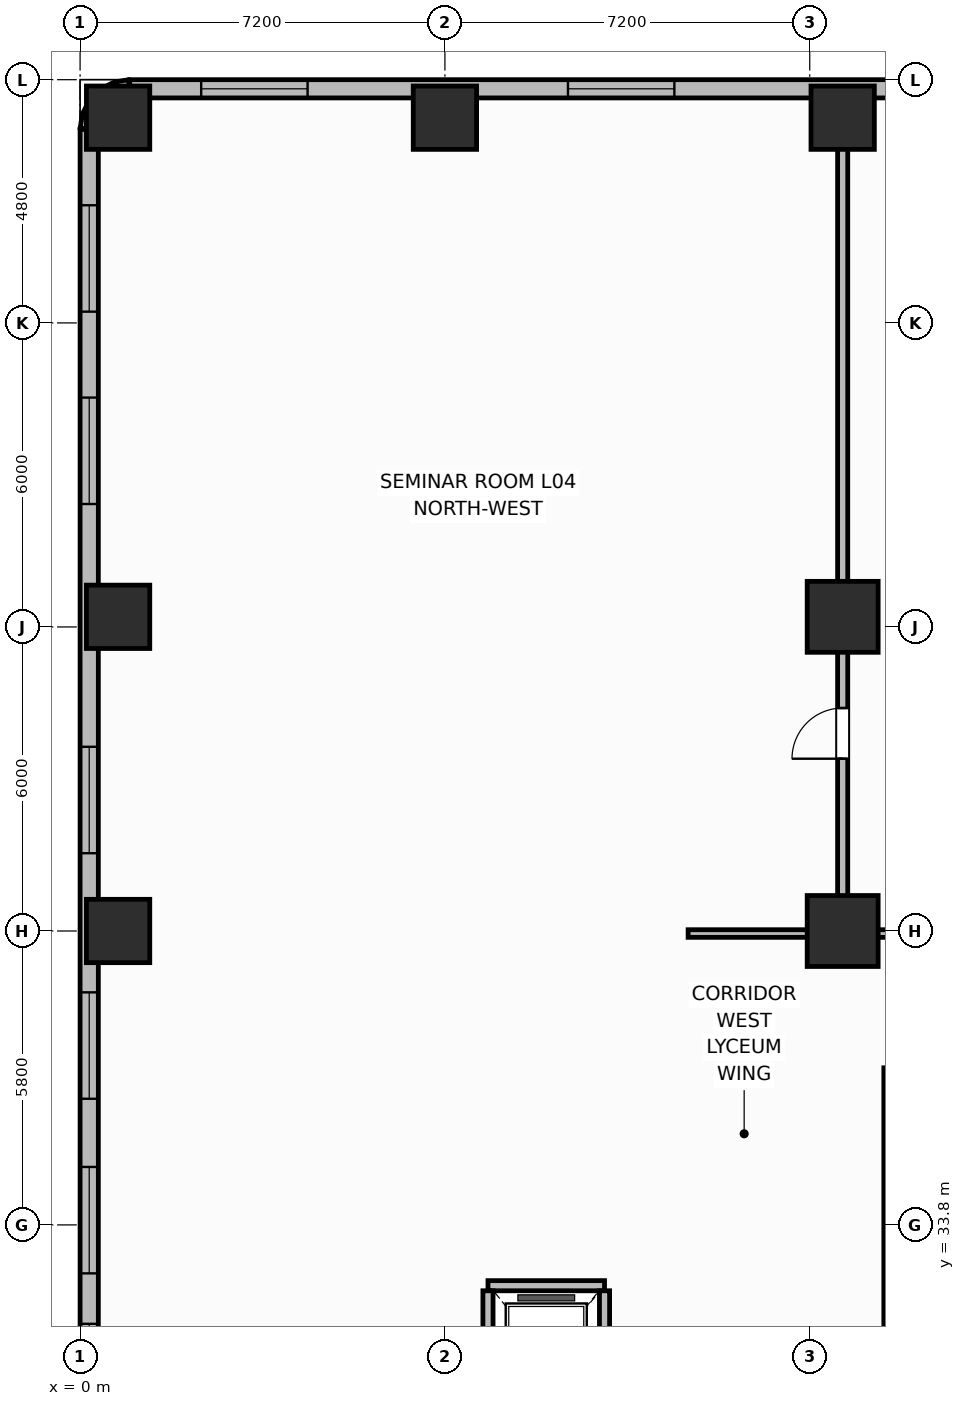
"""IFC4 building model, lengths in metres.
Left out: names, types, materials, properties, quantities, classifications, styles, units other than length and angle.
Written with IfcOpenShell. Run it as: python <this file> out.ifc"""

import sys

from ifc_helpers import new_model, si_unit, direction, frame, frame_2d, origin, origin_2d, place, context, subcontext, project, spatial, rectangle, extrude, element, fill, save


model = new_model("IFC4")
c1 = context("Model", 3, precision=1e-05, world=origin(), true_north=direction((0.0, 1.0)))
c2 = subcontext(c1, "Body", "Model", "MODEL_VIEW")
j1 = project(units=[si_unit("LENGTHUNIT", "METRE"), si_unit("PLANEANGLEUNIT", "RADIAN")], contexts=[c1])
p1 = place(None, origin())
s1 = spatial("IfcSite", under=j1, at=p1, CompositionType="ELEMENT")
p2 = place(p1, origin())
s2 = spatial("IfcBuilding", under=s1, at=p2, CompositionType="ELEMENT")
p3 = place(p2, frame((0.0, 0.0, 20.1)))
s3 = spatial("IfcBuildingStorey", under=s2, at=p3, CompositionType="ELEMENT", Elevation=20.1)
for number, where, z_axis, x_axis in (
    (1, (0.75, 39.6, 0.0), (0.0, 0.0, 1.0), (1.0, 0.0, 0.0)),
    (2, (0.75, 45.8, 0.0), (0.0, 0.0, 1.0), (1.0, 0.0, 0.0)),
    (3, (0.75, 55.65, 0.0), (0.0, 0.0, 1.0), (1.0, 0.0, 0.0)),
    (4, (7.2, 55.65, 0.0), (0.0, 0.0, 1.0), (1.0, 0.0, 0.0)),
    (5, (15.05, 55.65, 0.0), (0.0, 0.0, 1.0), (1.0, 0.0, 0.0)),
):
    element("IfcColumn", number, at=place(p3, frame(where, z_axis=z_axis, x_axis=x_axis)), inside=s3, PredefinedType="COLUMN", context=c2, shape_type="SweptSolid", body=[
        extrude(rectangle(XDim=1.25, YDim=1.25, at=origin_2d()), origin(), (0.0, 0.0, 1.0), 4.5),
    ])
for number, where, z_axis, x_axis in (
    (6, (15.05, 39.6, 0.0), (0.0, 0.0, 1.0), (1.0, 0.0, 0.0)),
    (7, (15.05, 45.8, 0.0), (0.0, 0.0, 1.0), (1.0, 0.0, 0.0)),
):
    element("IfcColumn", number, at=place(p3, frame(where, z_axis=z_axis, x_axis=x_axis)), inside=s3, PredefinedType="COLUMN", context=c2, shape_type="SweptSolid", body=[
        extrude(rectangle(XDim=1.4, YDim=1.4, at=origin_2d()), origin(), (0.0, 0.0, 1.0), 4.5),
    ])
p4 = place(p3, frame((56.57, 56.22, 0.0), z_axis=(0.0, 0.0, 1.0), x_axis=(-1.0, 0.0, 0.0)))
e8 = element("IfcWall", 8, at=p4, inside=s3, PredefinedType="SOLIDWALL", context=c2, shape_type="SweptSolid", body=[
    extrude(rectangle(XDim=55.59, YDim=0.36, at=frame_2d((27.795, 0.0))), origin(), (0.0, 0.0, 1.0), 2.3),
])
p5 = place(p4, frame((5.029, 0.0, 0.3)))
e9 = element("IfcOpeningElement", 9, at=p5, cuts=e8, PredefinedType="OPENING", context=c2, shape_type="SweptSolid", body=[
    extrude(rectangle(XDim=2.1, YDim=2.2, at=frame_2d((1.05, 1.1))), frame((0.0, 0.19, 0.0), z_axis=(0.0, -1.0, 0.0), x_axis=(1.0, 0.0, 0.0)), (0.0, 0.0, 1.0), 0.38),
])
p6 = place(p4, frame((8.648, 0.0, 0.3)))
e10 = element("IfcOpeningElement", 10, at=p6, cuts=e8, PredefinedType="OPENING", context=c2, shape_type="SweptSolid", body=[
    extrude(rectangle(XDim=2.1, YDim=2.2, at=frame_2d((1.05, 1.1))), frame((0.0, 0.19, 0.0), z_axis=(0.0, -1.0, 0.0), x_axis=(1.0, 0.0, 0.0)), (0.0, 0.0, 1.0), 0.38),
])
p7 = place(p4, frame((12.268, 0.0, 0.3)))
e11 = element("IfcOpeningElement", 11, at=p7, cuts=e8, PredefinedType="OPENING", context=c2, shape_type="SweptSolid", body=[
    extrude(rectangle(XDim=2.1, YDim=2.2, at=frame_2d((1.05, 1.1))), frame((0.0, 0.19, 0.0), z_axis=(0.0, -1.0, 0.0), x_axis=(1.0, 0.0, 0.0)), (0.0, 0.0, 1.0), 0.38),
])
p8 = place(p4, frame((19.506, 0.0, 0.3)))
e12 = element("IfcOpeningElement", 12, at=p8, cuts=e8, PredefinedType="OPENING", context=c2, shape_type="SweptSolid", body=[
    extrude(rectangle(XDim=2.1, YDim=2.2, at=frame_2d((1.05, 1.1))), frame((0.0, 0.19, 0.0), z_axis=(0.0, -1.0, 0.0), x_axis=(1.0, 0.0, 0.0)), (0.0, 0.0, 1.0), 0.38),
])
p9 = place(p4, frame((23.126, 0.0, 0.3)))
e13 = element("IfcOpeningElement", 13, at=p9, cuts=e8, PredefinedType="OPENING", context=c2, shape_type="SweptSolid", body=[
    extrude(rectangle(XDim=2.1, YDim=2.2, at=frame_2d((1.05, 1.1))), frame((0.0, 0.19, 0.0), z_axis=(0.0, -1.0, 0.0), x_axis=(1.0, 0.0, 0.0)), (0.0, 0.0, 1.0), 0.38),
])
p10 = place(p4, frame((26.745, 0.0, 0.3)))
e14 = element("IfcOpeningElement", 14, at=p10, cuts=e8, PredefinedType="OPENING", context=c2, shape_type="SweptSolid", body=[
    extrude(rectangle(XDim=2.1, YDim=2.2, at=frame_2d((1.05, 1.1))), frame((0.0, 0.19, 0.0), z_axis=(0.0, -1.0, 0.0), x_axis=(1.0, 0.0, 0.0)), (0.0, 0.0, 1.0), 0.38),
])
p11 = place(p4, frame((33.984, 0.0, 0.3)))
e15 = element("IfcOpeningElement", 15, at=p11, cuts=e8, PredefinedType="OPENING", context=c2, shape_type="SweptSolid", body=[
    extrude(rectangle(XDim=2.1, YDim=2.2, at=frame_2d((1.05, 1.1))), frame((0.0, 0.19, 0.0), z_axis=(0.0, -1.0, 0.0), x_axis=(1.0, 0.0, 0.0)), (0.0, 0.0, 1.0), 0.38),
])
p12 = place(p4, frame((37.603, 0.0, 0.3)))
e16 = element("IfcOpeningElement", 16, at=p12, cuts=e8, PredefinedType="OPENING", context=c2, shape_type="SweptSolid", body=[
    extrude(rectangle(XDim=2.1, YDim=2.2, at=frame_2d((1.05, 1.1))), frame((0.0, 0.19, 0.0), z_axis=(0.0, -1.0, 0.0), x_axis=(1.0, 0.0, 0.0)), (0.0, 0.0, 1.0), 0.38),
])
p13 = place(p4, frame((44.842, 0.0, 0.3)))
e17 = element("IfcOpeningElement", 17, at=p13, cuts=e8, PredefinedType="OPENING", context=c2, shape_type="SweptSolid", body=[
    extrude(rectangle(XDim=2.1, YDim=2.2, at=frame_2d((1.05, 1.1))), frame((0.0, 0.19, 0.0), z_axis=(0.0, -1.0, 0.0), x_axis=(1.0, 0.0, 0.0)), (0.0, 0.0, 1.0), 0.38),
])
p14 = place(p4, frame((52.08, 0.0, 0.3)))
e18 = element("IfcOpeningElement", 18, at=p14, cuts=e8, PredefinedType="OPENING", context=c2, shape_type="SweptSolid", body=[
    extrude(rectangle(XDim=2.1, YDim=2.2, at=frame_2d((1.05, 1.1))), frame((0.0, 0.19, 0.0), z_axis=(0.0, -1.0, 0.0), x_axis=(1.0, 0.0, 0.0)), (0.0, 0.0, 1.0), 0.38),
])
p15 = place(p3, frame((0.98, 56.22, 0.0), z_axis=(0.0, 0.0, 1.0), x_axis=(-0.987731290312, -0.156163049852, 0.0)))
e19 = element("IfcWall", 19, at=p15, inside=s3, PredefinedType="SOLIDWALL", context=c2, shape_type="SweptSolid", body=[
    extrude(rectangle(XDim=0.25, YDim=0.36, at=frame_2d((0.125, 0.0))), origin(), (0.0, 0.0, 1.0), 2.3),
])
p16 = place(p3, frame((0.733, 56.181, 0.0), z_axis=(0.0, 0.0, 1.0), x_axis=(-0.89089067942, -0.454217786225, 0.0)))
e20 = element("IfcWall", 20, at=p16, inside=s3, PredefinedType="SOLIDWALL", context=c2, shape_type="SweptSolid", body=[
    extrude(rectangle(XDim=0.25, YDim=0.36, at=frame_2d((0.125, 0.0))), origin(), (0.0, 0.0, 1.0), 2.3),
])
for number, where, z_axis, x_axis in (
    (21, (0.51, 56.067, 0.0), (0.0, 0.0, 1.0), (-0.707, -0.707, 0.0)),
    (22, (0.333, 55.89, 0.0), (0.0, 0.0, 1.0), (-0.454, -0.891, 0.0)),
):
    element("IfcWall", number, at=place(p3, frame(where, z_axis=z_axis, x_axis=x_axis)), inside=s3, PredefinedType="SOLIDWALL", context=c2, shape_type="SweptSolid", body=[
        extrude(rectangle(XDim=0.25, YDim=0.36, at=frame_2d((0.125, 0.0))), origin(), (0.0, 0.0, 1.0), 2.3),
    ])
p17 = place(p3, frame((0.219, 55.667, 0.0), z_axis=(0.0, 0.0, 1.0), x_axis=(-0.156963773077, -0.987604361038, 0.0)))
e23 = element("IfcWall", 23, at=p17, inside=s3, PredefinedType="SOLIDWALL", context=c2, shape_type="SweptSolid", body=[
    extrude(rectangle(XDim=0.25, YDim=0.36, at=frame_2d((0.125, 0.0))), origin(), (0.0, 0.0, 1.0), 2.3),
])
p18 = place(p3, frame((0.18, 55.42, 0.0), z_axis=(0.0, 0.0, 1.0), x_axis=(0.0, -1.0, 0.0)))
e24 = element("IfcWall", 24, at=p18, inside=s3, PredefinedType="SOLIDWALL", context=c2, shape_type="SweptSolid", body=[
    extrude(rectangle(XDim=54.44, YDim=0.36, at=frame_2d((27.22, 0.0))), origin(), (0.0, 0.0, 1.0), 2.3),
])
p19 = place(p18, frame((1.498, 0.0, 0.3)))
e25 = element("IfcOpeningElement", 25, at=p19, cuts=e24, PredefinedType="OPENING", context=c2, shape_type="SweptSolid", body=[
    extrude(rectangle(XDim=2.1, YDim=2.2, at=frame_2d((1.05, 1.1))), frame((0.0, 0.19, 0.0), z_axis=(0.0, -1.0, 0.0), x_axis=(1.0, 0.0, 0.0)), (0.0, 0.0, 1.0), 0.38),
])
p20 = place(p18, frame((5.294, 0.0, 0.3)))
e26 = element("IfcOpeningElement", 26, at=p20, cuts=e24, PredefinedType="OPENING", context=c2, shape_type="SweptSolid", body=[
    extrude(rectangle(XDim=2.1, YDim=2.2, at=frame_2d((1.05, 1.1))), frame((0.0, 0.19, 0.0), z_axis=(0.0, -1.0, 0.0), x_axis=(1.0, 0.0, 0.0)), (0.0, 0.0, 1.0), 0.38),
])
p21 = place(p18, frame((12.185, 0.0, 0.3)))
e27 = element("IfcOpeningElement", 27, at=p21, cuts=e24, PredefinedType="OPENING", context=c2, shape_type="SweptSolid", body=[
    extrude(rectangle(XDim=2.1, YDim=2.2, at=frame_2d((1.05, 1.1))), frame((0.0, 0.19, 0.0), z_axis=(0.0, -1.0, 0.0), x_axis=(1.0, 0.0, 0.0)), (0.0, 0.0, 1.0), 0.38),
])
p22 = place(p18, frame((17.031, 0.0, 0.3)))
e28 = element("IfcOpeningElement", 28, at=p22, cuts=e24, PredefinedType="OPENING", context=c2, shape_type="SweptSolid", body=[
    extrude(rectangle(XDim=2.1, YDim=2.2, at=frame_2d((1.05, 1.1))), frame((0.0, 0.19, 0.0), z_axis=(0.0, -1.0, 0.0), x_axis=(1.0, 0.0, 0.0)), (0.0, 0.0, 1.0), 0.38),
])
p23 = place(p18, frame((20.476, 0.0, 0.3)))
e29 = element("IfcOpeningElement", 29, at=p23, cuts=e24, PredefinedType="OPENING", context=c2, shape_type="SweptSolid", body=[
    extrude(rectangle(XDim=2.1, YDim=2.2, at=frame_2d((1.05, 1.1))), frame((0.0, 0.19, 0.0), z_axis=(0.0, -1.0, 0.0), x_axis=(1.0, 0.0, 0.0)), (0.0, 0.0, 1.0), 0.38),
])
p24 = place(p18, frame((23.572, 0.0, 0.3)))
e30 = element("IfcOpeningElement", 30, at=p24, cuts=e24, PredefinedType="OPENING", context=c2, shape_type="SweptSolid", body=[
    extrude(rectangle(XDim=2.1, YDim=2.2, at=frame_2d((1.05, 1.1))), frame((0.0, 0.19, 0.0), z_axis=(0.0, -1.0, 0.0), x_axis=(1.0, 0.0, 0.0)), (0.0, 0.0, 1.0), 0.38),
])
p25 = place(p18, frame((28.768, 0.0, 0.3)))
e31 = element("IfcOpeningElement", 31, at=p25, cuts=e24, PredefinedType="OPENING", context=c2, shape_type="SweptSolid", body=[
    extrude(rectangle(XDim=2.1, YDim=2.2, at=frame_2d((1.05, 1.1))), frame((0.0, 0.19, 0.0), z_axis=(0.0, -1.0, 0.0), x_axis=(1.0, 0.0, 0.0)), (0.0, 0.0, 1.0), 0.38),
])
p26 = place(p18, frame((31.864, 0.0, 0.3)))
e32 = element("IfcOpeningElement", 32, at=p26, cuts=e24, PredefinedType="OPENING", context=c2, shape_type="SweptSolid", body=[
    extrude(rectangle(XDim=2.1, YDim=2.2, at=frame_2d((1.05, 1.1))), frame((0.0, 0.19, 0.0), z_axis=(0.0, -1.0, 0.0), x_axis=(1.0, 0.0, 0.0)), (0.0, 0.0, 1.0), 0.38),
])
p27 = place(p18, frame((35.309, 0.0, 0.3)))
e33 = element("IfcOpeningElement", 33, at=p27, cuts=e24, PredefinedType="OPENING", context=c2, shape_type="SweptSolid", body=[
    extrude(rectangle(XDim=2.1, YDim=2.2, at=frame_2d((1.05, 1.1))), frame((0.0, 0.19, 0.0), z_axis=(0.0, -1.0, 0.0), x_axis=(1.0, 0.0, 0.0)), (0.0, 0.0, 1.0), 0.38),
])
p28 = place(p18, frame((40.155, 0.0, 0.3)))
e34 = element("IfcOpeningElement", 34, at=p28, cuts=e24, PredefinedType="OPENING", context=c2, shape_type="SweptSolid", body=[
    extrude(rectangle(XDim=2.1, YDim=2.2, at=frame_2d((1.05, 1.1))), frame((0.0, 0.19, 0.0), z_axis=(0.0, -1.0, 0.0), x_axis=(1.0, 0.0, 0.0)), (0.0, 0.0, 1.0), 0.38),
])
p29 = place(p18, frame((47.046, 0.0, 0.3)))
e35 = element("IfcOpeningElement", 35, at=p29, cuts=e24, PredefinedType="OPENING", context=c2, shape_type="SweptSolid", body=[
    extrude(rectangle(XDim=2.1, YDim=2.2, at=frame_2d((1.05, 1.1))), frame((0.0, 0.19, 0.0), z_axis=(0.0, -1.0, 0.0), x_axis=(1.0, 0.0, 0.0)), (0.0, 0.0, 1.0), 0.38),
])
p30 = place(p18, frame((50.842, 0.0, 0.3)))
e36 = element("IfcOpeningElement", 36, at=p30, cuts=e24, PredefinedType="OPENING", context=c2, shape_type="SweptSolid", body=[
    extrude(rectangle(XDim=2.1, YDim=2.2, at=frame_2d((1.05, 1.1))), frame((0.0, 0.19, 0.0), z_axis=(0.0, -1.0, 0.0), x_axis=(1.0, 0.0, 0.0)), (0.0, 0.0, 1.0), 0.38),
])
p31 = place(p3, frame((8.05, 32.6, 0.0), z_axis=(0.0, 0.0, 1.0), x_axis=(1.0, 0.0, 0.0)))
e37 = element("IfcWall", 37, at=p31, inside=s3, PredefinedType="PARTITIONING", context=c2, shape_type="SweptSolid", body=[
    extrude(rectangle(XDim=2.3, YDim=0.2, at=frame_2d((1.15, 0.0))), origin(), (0.0, 0.0, 1.0), 2.26),
])
for number, where, z_axis, x_axis in (
    (38, (8.05, 29.9, 0.0), (0.0, 0.0, 1.0), (0.0, 1.0, 0.0)),
    (39, (10.35, 29.9, 0.0), (0.0, 0.0, 1.0), (0.0, 1.0, 0.0)),
):
    element("IfcWall", number, at=place(p3, frame(where, z_axis=z_axis, x_axis=x_axis)), inside=s3, PredefinedType="PARTITIONING", context=c2, shape_type="SweptSolid", body=[
        extrude(rectangle(XDim=2.6, YDim=0.2, at=frame_2d((1.3, 0.0))), origin(), (0.0, 0.0, 1.0), 2.26),
    ])
p32 = place(p3, frame((15.95, 19.5, 0.0), z_axis=(0.0, 0.0, 1.0), x_axis=(0.0, 1.0, 0.0)))
e40 = element("IfcWall", 40, at=p32, inside=s3, PredefinedType="PARTITIONING", context=c2, shape_type="SweptSolid", body=[
    extrude(rectangle(XDim=17.4, YDim=0.175, at=frame_2d((8.7, 0.0))), origin(), (0.0, 0.0, 1.0), 2.26),
])
p33 = place(p3, frame((15.05, 39.6, 0.0), z_axis=(0.0, 0.0, 1.0), x_axis=(0.0, 1.0, 0.0)))
e41 = element("IfcWall", 41, at=p33, inside=s3, PredefinedType="PARTITIONING", context=c2, shape_type="SweptSolid", body=[
    extrude(rectangle(XDim=16.4, YDim=0.2, at=frame_2d((8.2, 0.0))), origin(), (0.0, 0.0, 1.0), 2.26),
])
p34 = place(p33, frame((3.4, 0.0, 0.0)))
e42 = element("IfcOpeningElement", 42, at=p34, cuts=e41, PredefinedType="OPENING", context=c2, shape_type="SweptSolid", body=[
    extrude(rectangle(XDim=1.0, YDim=2.15, at=frame_2d((0.5, 1.075))), frame((0.0, 0.11, 0.0), z_axis=(0.0, -1.0, 0.0), x_axis=(1.0, 0.0, 0.0)), (0.0, 0.0, 1.0), 0.22),
])
p35 = place(p3, frame((25.25, 39.55, 0.0), z_axis=(0.0, 0.0, 1.0), x_axis=(-1.0, 0.0, 0.0)))
e43 = element("IfcWall", 43, at=p35, inside=s3, PredefinedType="PARTITIONING", context=c2, shape_type="SweptSolid", body=[
    extrude(rectangle(XDim=13.25, YDim=0.15, at=frame_2d((6.625, 0.0))), origin(), (0.0, 0.0, 1.0), 2.26),
])
p36 = place(p35, frame((4.2, 0.0, 0.0)))
e44 = element("IfcOpeningElement", 44, at=p36, cuts=e43, PredefinedType="OPENING", context=c2, shape_type="SweptSolid", body=[
    extrude(rectangle(XDim=1.0, YDim=2.15, at=frame_2d((0.5, 1.075))), frame((0.0, 0.085, 0.0), z_axis=(0.0, -1.0, 0.0), x_axis=(1.0, 0.0, 0.0)), (0.0, 0.0, 1.0), 0.17),
])
p37 = place(p13, origin())
e45 = element("IfcWindow", 45, at=p37, inside=s3, PartitioningType="SINGLE_PANEL", PredefinedType="WINDOW", context=c2, shape_type="SweptSolid", body=[
    extrude(rectangle(XDim=2.1, YDim=2.2, at=frame_2d((1.05, 1.1))), frame((0.0, 0.03, 0.0), z_axis=(0.0, -1.0, 0.0), x_axis=(1.0, 0.0, 0.0)), (0.0, 0.0, 1.0), 0.06),
])
fill(e17, e45)
p38 = place(p14, origin())
e46 = element("IfcWindow", 46, at=p38, inside=s3, PartitioningType="SINGLE_PANEL", PredefinedType="WINDOW", context=c2, shape_type="SweptSolid", body=[
    extrude(rectangle(XDim=2.1, YDim=2.2, at=frame_2d((1.05, 1.1))), frame((0.0, 0.03, 0.0), z_axis=(0.0, -1.0, 0.0), x_axis=(1.0, 0.0, 0.0)), (0.0, 0.0, 1.0), 0.06),
])
fill(e18, e46)
p39 = place(p19, origin())
e47 = element("IfcWindow", 47, at=p39, inside=s3, PartitioningType="SINGLE_PANEL", PredefinedType="WINDOW", context=c2, shape_type="SweptSolid", body=[
    extrude(rectangle(XDim=2.1, YDim=2.2, at=frame_2d((1.05, 1.1))), frame((0.0, 0.03, 0.0), z_axis=(0.0, -1.0, 0.0), x_axis=(1.0, 0.0, 0.0)), (0.0, 0.0, 1.0), 0.06),
])
fill(e25, e47)
p40 = place(p20, origin())
e48 = element("IfcWindow", 48, at=p40, inside=s3, PartitioningType="SINGLE_PANEL", PredefinedType="WINDOW", context=c2, shape_type="SweptSolid", body=[
    extrude(rectangle(XDim=2.1, YDim=2.2, at=frame_2d((1.05, 1.1))), frame((0.0, 0.03, 0.0), z_axis=(0.0, -1.0, 0.0), x_axis=(1.0, 0.0, 0.0)), (0.0, 0.0, 1.0), 0.06),
])
fill(e26, e48)
p41 = place(p21, origin())
e49 = element("IfcWindow", 49, at=p41, inside=s3, PartitioningType="SINGLE_PANEL", PredefinedType="WINDOW", context=c2, shape_type="SweptSolid", body=[
    extrude(rectangle(XDim=2.1, YDim=2.2, at=frame_2d((1.05, 1.1))), frame((0.0, 0.03, 0.0), z_axis=(0.0, -1.0, 0.0), x_axis=(1.0, 0.0, 0.0)), (0.0, 0.0, 1.0), 0.06),
])
fill(e27, e49)
p42 = place(p22, origin())
e50 = element("IfcWindow", 50, at=p42, inside=s3, PartitioningType="SINGLE_PANEL", PredefinedType="WINDOW", context=c2, shape_type="SweptSolid", body=[
    extrude(rectangle(XDim=2.1, YDim=2.2, at=frame_2d((1.05, 1.1))), frame((0.0, 0.03, 0.0), z_axis=(0.0, -1.0, 0.0), x_axis=(1.0, 0.0, 0.0)), (0.0, 0.0, 1.0), 0.06),
])
fill(e28, e50)
p43 = place(p23, origin())
e51 = element("IfcWindow", 51, at=p43, inside=s3, PartitioningType="SINGLE_PANEL", PredefinedType="WINDOW", context=c2, shape_type="SweptSolid", body=[
    extrude(rectangle(XDim=2.1, YDim=2.2, at=frame_2d((1.05, 1.1))), frame((0.0, 0.03, 0.0), z_axis=(0.0, -1.0, 0.0), x_axis=(1.0, 0.0, 0.0)), (0.0, 0.0, 1.0), 0.06),
])
fill(e29, e51)
p44 = place(p24, origin())
e52 = element("IfcWindow", 52, at=p44, inside=s3, PartitioningType="SINGLE_PANEL", PredefinedType="WINDOW", context=c2, shape_type="SweptSolid", body=[
    extrude(rectangle(XDim=2.1, YDim=2.2, at=frame_2d((1.05, 1.1))), frame((0.0, 0.03, 0.0), z_axis=(0.0, -1.0, 0.0), x_axis=(1.0, 0.0, 0.0)), (0.0, 0.0, 1.0), 0.06),
])
fill(e30, e52)
p45 = place(p34, origin())
e53 = element("IfcDoor", 53, at=p45, inside=s3, OperationType="SINGLE_SWING_LEFT", PredefinedType="DOOR", context=c2, shape_type="SweptSolid", body=[
    extrude(rectangle(XDim=1.0, YDim=2.15, at=frame_2d((0.5, 1.075))), frame((0.0, 0.025, 0.0), z_axis=(0.0, -1.0, 0.0), x_axis=(1.0, 0.0, 0.0)), (0.0, 0.0, 1.0), 0.05),
])
fill(e42, e53)
save(model, sys.argv[1])
